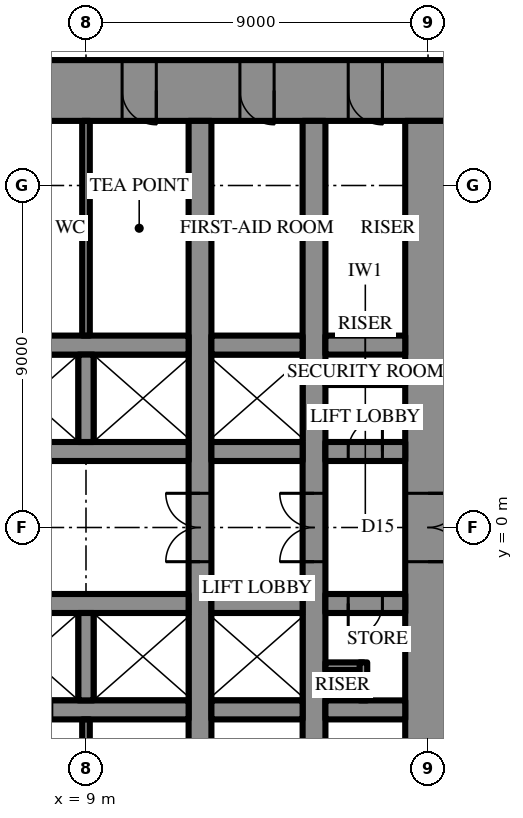
"""IFC4 building model, lengths in metres.
Left out: names, types, materials, properties, quantities, classifications, styles, units other than length and angle.
Written with IfcOpenShell. Run it as: python <this file> out.ifc"""

import sys

from ifc_helpers import new_model, si_unit, direction, frame, frame_2d, origin, place, context, subcontext, project, spatial, rectangle, extrude, element, fill, save


model = new_model("IFC4")
c1 = context("Model", 3, precision=1e-05, world=origin(), true_north=direction((0.0, 1.0)))
c2 = subcontext(c1, "Body", "Model", "MODEL_VIEW")
j1 = project(units=[si_unit("LENGTHUNIT", "METRE"), si_unit("PLANEANGLEUNIT", "RADIAN")], contexts=[c1])
p1 = place(None, origin())
s1 = spatial("IfcSite", under=j1, at=p1, CompositionType="ELEMENT")
p2 = place(p1, origin())
s2 = spatial("IfcBuilding", under=s1, at=p2, CompositionType="ELEMENT")
p3 = place(p2, frame((0.0, 0.0, 186.7)))
s3 = spatial("IfcBuildingStorey", under=s2, at=p3, CompositionType="ELEMENT", Elevation=186.7)
p4 = place(p3, frame((-18.6, 11.5, 0.0), z_axis=(0.0, 0.0, 1.0), x_axis=(1.0, 0.0, 0.0)))
e1 = element("IfcWall", 1, at=p4, inside=s3, PredefinedType="SHEAR", context=c2, shape_type="SweptSolid", body=[
    extrude(rectangle(XDim=37.2, YDim=1.6, at=frame_2d((18.6, 0.0))), origin(), (0.0, 0.0, 1.0), 4.2),
])
p5 = place(p4, frame((19.45, 0.0, 0.0)))
e2 = element("IfcOpeningElement", 2, at=p5, cuts=e1, PredefinedType="OPENING", context=c2, shape_type="SweptSolid", body=[
    extrude(rectangle(XDim=0.9, YDim=2.2, at=frame_2d((0.45, 1.1))), frame((0.0, 0.81, 0.0), z_axis=(0.0, -1.0, 0.0), x_axis=(1.0, 0.0, 0.0)), (0.0, 0.0, 1.0), 1.62),
])
p6 = place(p4, frame((22.45, 0.0, 0.0)))
e3 = element("IfcOpeningElement", 3, at=p6, cuts=e1, PredefinedType="OPENING", context=c2, shape_type="SweptSolid", body=[
    extrude(rectangle(XDim=0.9, YDim=2.2, at=frame_2d((0.45, 1.1))), frame((0.0, 0.81, 0.0), z_axis=(0.0, -1.0, 0.0), x_axis=(1.0, 0.0, 0.0)), (0.0, 0.0, 1.0), 1.62),
])
p7 = place(p4, frame((25.5, 0.0, 0.0)))
e4 = element("IfcOpeningElement", 4, at=p7, cuts=e1, PredefinedType="OPENING", context=c2, shape_type="SweptSolid", body=[
    extrude(rectangle(XDim=1.0, YDim=2.2, at=frame_2d((0.5, 1.1))), frame((0.0, 0.81, 0.0), z_axis=(0.0, -1.0, 0.0), x_axis=(1.0, 0.0, 0.0)), (0.0, 0.0, 1.0), 1.62),
])
p8 = place(p4, frame((1.8, 0.0, 0.0)))
e5 = element("IfcOpeningElement", 5, at=p8, cuts=e1, PredefinedType="OPENING", context=c2, shape_type="SweptSolid", body=[
    extrude(rectangle(XDim=0.9, YDim=2.2, at=frame_2d((0.45, 1.1))), frame((0.0, 0.81, 0.0), z_axis=(0.0, -1.0, 0.0), x_axis=(1.0, 0.0, 0.0)), (0.0, 0.0, 1.0), 1.62),
])
p9 = place(p4, frame((4.65, 0.0, 0.0)))
e6 = element("IfcOpeningElement", 6, at=p9, cuts=e1, PredefinedType="OPENING", context=c2, shape_type="SweptSolid", body=[
    extrude(rectangle(XDim=0.9, YDim=2.2, at=frame_2d((0.45, 1.1))), frame((0.0, 0.81, 0.0), z_axis=(0.0, -1.0, 0.0), x_axis=(1.0, 0.0, 0.0)), (0.0, 0.0, 1.0), 1.62),
])
p10 = place(p4, frame((7.75, 0.0, 0.0)))
e7 = element("IfcOpeningElement", 7, at=p10, cuts=e1, PredefinedType="OPENING", context=c2, shape_type="SweptSolid", body=[
    extrude(rectangle(XDim=0.9, YDim=2.2, at=frame_2d((0.45, 1.1))), frame((0.0, 0.81, 0.0), z_axis=(0.0, -1.0, 0.0), x_axis=(1.0, 0.0, 0.0)), (0.0, 0.0, 1.0), 1.62),
])
p11 = place(p4, frame((28.55, 0.0, 0.0)))
e8 = element("IfcOpeningElement", 8, at=p11, cuts=e1, PredefinedType="OPENING", context=c2, shape_type="SweptSolid", body=[
    extrude(rectangle(XDim=0.9, YDim=2.2, at=frame_2d((0.45, 1.1))), frame((0.0, 0.81, 0.0), z_axis=(0.0, -1.0, 0.0), x_axis=(1.0, 0.0, 0.0)), (0.0, 0.0, 1.0), 1.62),
])
p12 = place(p4, frame((31.65, 0.0, 0.0)))
e9 = element("IfcOpeningElement", 9, at=p12, cuts=e1, PredefinedType="OPENING", context=c2, shape_type="SweptSolid", body=[
    extrude(rectangle(XDim=0.9, YDim=2.2, at=frame_2d((0.45, 1.1))), frame((0.0, 0.81, 0.0), z_axis=(0.0, -1.0, 0.0), x_axis=(1.0, 0.0, 0.0)), (0.0, 0.0, 1.0), 1.62),
])
p13 = place(p4, frame((34.5, 0.0, 0.0)))
e10 = element("IfcOpeningElement", 10, at=p13, cuts=e1, PredefinedType="OPENING", context=c2, shape_type="SweptSolid", body=[
    extrude(rectangle(XDim=0.9, YDim=2.2, at=frame_2d((0.45, 1.1))), frame((0.0, 0.81, 0.0), z_axis=(0.0, -1.0, 0.0), x_axis=(1.0, 0.0, 0.0)), (0.0, 0.0, 1.0), 1.62),
])
p14 = place(p3, frame((18.0, -10.7, 0.0), z_axis=(0.0, 0.0, 1.0), x_axis=(0.0, 1.0, 0.0)))
e11 = element("IfcWall", 11, at=p14, inside=s3, PredefinedType="SHEAR", context=c2, shape_type="SweptSolid", body=[
    extrude(rectangle(XDim=21.4, YDim=1.2, at=frame_2d((10.7, 0.0))), origin(), (0.0, 0.0, 1.0), 4.2),
])
p15 = place(p14, frame((9.8, 0.0, 0.0)))
e12 = element("IfcOpeningElement", 12, at=p15, cuts=e11, PredefinedType="OPENING", context=c2, shape_type="SweptSolid", body=[
    extrude(rectangle(XDim=1.8, YDim=2.4, at=frame_2d((0.9, 1.2))), frame((0.0, 0.61, 0.0), z_axis=(0.0, -1.0, 0.0), x_axis=(1.0, 0.0, 0.0)), (0.0, 0.0, 1.0), 1.22),
])
p16 = place(p3, frame((12.0, -10.7, 0.0), z_axis=(0.0, 0.0, 1.0), x_axis=(0.0, 1.0, 0.0)))
e13 = element("IfcWall", 13, at=p16, inside=s3, PredefinedType="SHEAR", context=c2, shape_type="SweptSolid", body=[
    extrude(rectangle(XDim=21.4, YDim=0.6, at=frame_2d((10.7, 0.0))), origin(), (0.0, 0.0, 1.0), 4.2),
])
p17 = place(p16, frame((9.8, 0.0, 0.0)))
e14 = element("IfcOpeningElement", 14, at=p17, cuts=e13, PredefinedType="OPENING", context=c2, shape_type="SweptSolid", body=[
    extrude(rectangle(XDim=1.8, YDim=2.4, at=frame_2d((0.9, 1.2))), frame((0.0, 0.31, 0.0), z_axis=(0.0, -1.0, 0.0), x_axis=(1.0, 0.0, 0.0)), (0.0, 0.0, 1.0), 0.62),
])
p18 = place(p3, frame((15.0, -10.7, 0.0), z_axis=(0.0, 0.0, 1.0), x_axis=(0.0, 1.0, 0.0)))
e15 = element("IfcWall", 15, at=p18, inside=s3, PredefinedType="SHEAR", context=c2, shape_type="SweptSolid", body=[
    extrude(rectangle(XDim=21.4, YDim=0.6, at=frame_2d((10.7, 0.0))), origin(), (0.0, 0.0, 1.0), 4.2),
])
p19 = place(p18, frame((9.8, 0.0, 0.0)))
e16 = element("IfcOpeningElement", 16, at=p19, cuts=e15, PredefinedType="OPENING", context=c2, shape_type="SweptSolid", body=[
    extrude(rectangle(XDim=1.8, YDim=2.4, at=frame_2d((0.9, 1.2))), frame((0.0, 0.31, 0.0), z_axis=(0.0, -1.0, 0.0), x_axis=(1.0, 0.0, 0.0)), (0.0, 0.0, 1.0), 0.62),
])
p20 = place(p3, frame((-3.2, 2.0, 0.0), z_axis=(0.0, 0.0, 1.0), x_axis=(1.0, 0.0, 0.0)))
e17 = element("IfcWall", 17, at=p20, inside=s3, PredefinedType="SHEAR", context=c2, shape_type="SweptSolid", body=[
    extrude(rectangle(XDim=14.9, YDim=0.5, at=frame_2d((7.45, 0.0))), origin(), (0.0, 0.0, 1.0), 4.2),
])
p21 = place(p20, frame((1.15, 0.0, 0.0)))
e18 = element("IfcOpeningElement", 18, at=p21, cuts=e17, PredefinedType="OPENING", context=c2, shape_type="SweptSolid", body=[
    extrude(rectangle(XDim=1.1, YDim=2.2, at=frame_2d((0.55, 1.1))), frame((0.0, 0.26, 0.0), z_axis=(0.0, -1.0, 0.0), x_axis=(1.0, 0.0, 0.0)), (0.0, 0.0, 1.0), 0.52),
])
p22 = place(p20, frame((4.15, 0.0, 0.0)))
e19 = element("IfcOpeningElement", 19, at=p22, cuts=e17, PredefinedType="OPENING", context=c2, shape_type="SweptSolid", body=[
    extrude(rectangle(XDim=1.1, YDim=2.2, at=frame_2d((0.55, 1.1))), frame((0.0, 0.26, 0.0), z_axis=(0.0, -1.0, 0.0), x_axis=(1.0, 0.0, 0.0)), (0.0, 0.0, 1.0), 0.52),
])
p23 = place(p20, frame((7.15, 0.0, 0.0)))
e20 = element("IfcOpeningElement", 20, at=p23, cuts=e17, PredefinedType="OPENING", context=c2, shape_type="SweptSolid", body=[
    extrude(rectangle(XDim=1.1, YDim=2.2, at=frame_2d((0.55, 1.1))), frame((0.0, 0.26, 0.0), z_axis=(0.0, -1.0, 0.0), x_axis=(1.0, 0.0, 0.0)), (0.0, 0.0, 1.0), 0.52),
])
p24 = place(p20, frame((10.15, 0.0, 0.0)))
e21 = element("IfcOpeningElement", 21, at=p24, cuts=e17, PredefinedType="OPENING", context=c2, shape_type="SweptSolid", body=[
    extrude(rectangle(XDim=1.1, YDim=2.2, at=frame_2d((0.55, 1.1))), frame((0.0, 0.26, 0.0), z_axis=(0.0, -1.0, 0.0), x_axis=(1.0, 0.0, 0.0)), (0.0, 0.0, 1.0), 0.52),
])
p25 = place(p3, frame((12.3, 2.0, 0.0), z_axis=(0.0, 0.0, 1.0), x_axis=(1.0, 0.0, 0.0)))
e22 = element("IfcWall", 22, at=p25, inside=s3, PredefinedType="SHEAR", context=c2, shape_type="SweptSolid", body=[
    extrude(rectangle(XDim=2.4, YDim=0.5, at=frame_2d((1.2, 0.0))), origin(), (0.0, 0.0, 1.0), 4.2),
])
p26 = place(p3, frame((15.3, 2.0, 0.0), z_axis=(0.0, 0.0, 1.0), x_axis=(1.0, 0.0, 0.0)))
e23 = element("IfcWall", 23, at=p26, inside=s3, PredefinedType="SHEAR", context=c2, shape_type="SweptSolid", body=[
    extrude(rectangle(XDim=2.1, YDim=0.5, at=frame_2d((1.05, 0.0))), origin(), (0.0, 0.0, 1.0), 4.2),
])
p27 = place(p26, frame((0.6, 0.0, 0.0)))
e24 = element("IfcOpeningElement", 24, at=p27, cuts=e23, PredefinedType="OPENING", context=c2, shape_type="SweptSolid", body=[
    extrude(rectangle(XDim=0.9, YDim=2.2, at=frame_2d((0.45, 1.1))), frame((0.0, 0.26, 0.0), z_axis=(0.0, -1.0, 0.0), x_axis=(1.0, 0.0, 0.0)), (0.0, 0.0, 1.0), 0.52),
])
p28 = place(p3, frame((-11.7, 4.8, 0.0), z_axis=(0.0, 0.0, 1.0), x_axis=(1.0, 0.0, 0.0)))
e25 = element("IfcWall", 25, at=p28, inside=s3, PredefinedType="SHEAR", context=c2, shape_type="SweptSolid", body=[
    extrude(rectangle(XDim=23.4, YDim=0.5, at=frame_2d((11.7, 0.0))), origin(), (0.0, 0.0, 1.0), 4.2),
])
p29 = place(p28, frame((6.6, 0.0, 0.0)))
e26 = element("IfcOpeningElement", 26, at=p29, cuts=e25, PredefinedType="OPENING", context=c2, shape_type="SweptSolid", body=[
    extrude(rectangle(XDim=1.2, YDim=2.2, at=frame_2d((0.6, 1.1))), frame((0.0, 0.26, 0.0), z_axis=(0.0, -1.0, 0.0), x_axis=(1.0, 0.0, 0.0)), (0.0, 0.0, 1.0), 0.52),
])
p30 = place(p28, frame((3.6, 0.0, 0.0)))
e27 = element("IfcOpeningElement", 27, at=p30, cuts=e25, PredefinedType="OPENING", context=c2, shape_type="SweptSolid", body=[
    extrude(rectangle(XDim=1.2, YDim=2.2, at=frame_2d((0.6, 1.1))), frame((0.0, 0.26, 0.0), z_axis=(0.0, -1.0, 0.0), x_axis=(1.0, 0.0, 0.0)), (0.0, 0.0, 1.0), 0.52),
])
p31 = place(p3, frame((12.3, 4.8, 0.0), z_axis=(0.0, 0.0, 1.0), x_axis=(1.0, 0.0, 0.0)))
e28 = element("IfcWall", 28, at=p31, inside=s3, PredefinedType="SHEAR", context=c2, shape_type="SweptSolid", body=[
    extrude(rectangle(XDim=2.4, YDim=0.5, at=frame_2d((1.2, 0.0))), origin(), (0.0, 0.0, 1.0), 4.2),
])
p32 = place(p3, frame((15.3, 4.8, 0.0), z_axis=(0.0, 0.0, 1.0), x_axis=(1.0, 0.0, 0.0)))
e29 = element("IfcWall", 29, at=p32, inside=s3, PredefinedType="SHEAR", context=c2, shape_type="SweptSolid", body=[
    extrude(rectangle(XDim=2.1, YDim=0.5, at=frame_2d((1.05, 0.0))), origin(), (0.0, 0.0, 1.0), 4.2),
])
p33 = place(p3, frame((9.0, 2.25, 0.0), z_axis=(0.0, 0.0, 1.0), x_axis=(0.0, 1.0, 0.0)))
e30 = element("IfcWall", 30, at=p33, inside=s3, PredefinedType="SHEAR", context=c2, shape_type="SweptSolid", body=[
    extrude(rectangle(XDim=2.3, YDim=0.4, at=frame_2d((1.15, 0.0))), origin(), (0.0, 0.0, 1.0), 4.2),
])
p34 = place(p3, frame((17.4, -2.0, 0.0), z_axis=(0.0, 0.0, 1.0), x_axis=(-1.0, 0.0, 0.0)))
e31 = element("IfcWall", 31, at=p34, inside=s3, PredefinedType="SHEAR", context=c2, shape_type="SweptSolid", body=[
    extrude(rectangle(XDim=2.1, YDim=0.5, at=frame_2d((1.05, 0.0))), origin(), (0.0, 0.0, 1.0), 4.2),
])
p35 = place(p34, frame((0.6, 0.0, 0.0)))
e32 = element("IfcOpeningElement", 32, at=p35, cuts=e31, PredefinedType="OPENING", context=c2, shape_type="SweptSolid", body=[
    extrude(rectangle(XDim=0.9, YDim=2.2, at=frame_2d((0.45, 1.1))), frame((0.0, 0.26, 0.0), z_axis=(0.0, -1.0, 0.0), x_axis=(1.0, 0.0, 0.0)), (0.0, 0.0, 1.0), 0.52),
])
p36 = place(p3, frame((14.7, -2.0, 0.0), z_axis=(0.0, 0.0, 1.0), x_axis=(-1.0, 0.0, 0.0)))
e33 = element("IfcWall", 33, at=p36, inside=s3, PredefinedType="SHEAR", context=c2, shape_type="SweptSolid", body=[
    extrude(rectangle(XDim=2.4, YDim=0.5, at=frame_2d((1.2, 0.0))), origin(), (0.0, 0.0, 1.0), 4.2),
])
p37 = place(p3, frame((11.7, -2.0, 0.0), z_axis=(0.0, 0.0, 1.0), x_axis=(-1.0, 0.0, 0.0)))
e34 = element("IfcWall", 34, at=p37, inside=s3, PredefinedType="SHEAR", context=c2, shape_type="SweptSolid", body=[
    extrude(rectangle(XDim=5.9, YDim=0.5, at=frame_2d((2.95, 0.0))), origin(), (0.0, 0.0, 1.0), 4.2),
])
p38 = place(p3, frame((17.4, -4.8, 0.0), z_axis=(0.0, 0.0, 1.0), x_axis=(-1.0, 0.0, 0.0)))
e35 = element("IfcWall", 35, at=p38, inside=s3, PredefinedType="SHEAR", context=c2, shape_type="SweptSolid", body=[
    extrude(rectangle(XDim=2.1, YDim=0.5, at=frame_2d((1.05, 0.0))), origin(), (0.0, 0.0, 1.0), 4.2),
])
p39 = place(p3, frame((14.7, -4.8, 0.0), z_axis=(0.0, 0.0, 1.0), x_axis=(-1.0, 0.0, 0.0)))
e36 = element("IfcWall", 36, at=p39, inside=s3, PredefinedType="SHEAR", context=c2, shape_type="SweptSolid", body=[
    extrude(rectangle(XDim=2.4, YDim=0.5, at=frame_2d((1.2, 0.0))), origin(), (0.0, 0.0, 1.0), 4.2),
])
p40 = place(p3, frame((11.7, -4.8, 0.0), z_axis=(0.0, 0.0, 1.0), x_axis=(-1.0, 0.0, 0.0)))
e37 = element("IfcWall", 37, at=p40, inside=s3, PredefinedType="SHEAR", context=c2, shape_type="SweptSolid", body=[
    extrude(rectangle(XDim=23.4, YDim=0.5, at=frame_2d((11.7, 0.0))), origin(), (0.0, 0.0, 1.0), 4.2),
])
p41 = place(p40, frame((6.6, 0.0, 0.0)))
e38 = element("IfcOpeningElement", 38, at=p41, cuts=e37, PredefinedType="OPENING", context=c2, shape_type="SweptSolid", body=[
    extrude(rectangle(XDim=1.2, YDim=2.2, at=frame_2d((0.6, 1.1))), frame((0.0, 0.26, 0.0), z_axis=(0.0, -1.0, 0.0), x_axis=(1.0, 0.0, 0.0)), (0.0, 0.0, 1.0), 0.52),
])
p42 = place(p40, frame((3.6, 0.0, 0.0)))
e39 = element("IfcOpeningElement", 39, at=p42, cuts=e37, PredefinedType="OPENING", context=c2, shape_type="SweptSolid", body=[
    extrude(rectangle(XDim=1.2, YDim=2.2, at=frame_2d((0.6, 1.1))), frame((0.0, 0.26, 0.0), z_axis=(0.0, -1.0, 0.0), x_axis=(1.0, 0.0, 0.0)), (0.0, 0.0, 1.0), 0.52),
])
p43 = place(p3, frame((9.0, -2.25, 0.0), z_axis=(0.0, 0.0, 1.0), x_axis=(0.0, -1.0, 0.0)))
e40 = element("IfcWall", 40, at=p43, inside=s3, PredefinedType="SHEAR", context=c2, shape_type="SweptSolid", body=[
    extrude(rectangle(XDim=2.3, YDim=0.4, at=frame_2d((1.15, 0.0))), origin(), (0.0, 0.0, 1.0), 4.2),
])
for number, where, z_axis, x_axis in (
    (41, (9.0, 5.05, 0.0), (0.0, 0.0, 1.0), (0.0, 1.0, 0.0)),
    (42, (9.0, -5.05, 0.0), (0.0, 0.0, 1.0), (0.0, -1.0, 0.0)),
):
    element("IfcWall", number, at=place(p3, frame(where, z_axis=z_axis, x_axis=x_axis)), inside=s3, PredefinedType="PARTITIONING", context=c2, shape_type="SweptSolid", body=[
        extrude(rectangle(XDim=5.65, YDim=0.2, at=frame_2d((2.825, 0.0))), origin(), (0.0, 0.0, 1.0), 4.0),
    ])
p44 = place(p3, frame((15.3, 3.85, 0.0), z_axis=(0.0, 0.0, 1.0), x_axis=(1.0, 0.0, 0.0)))
e43 = element("IfcWall", 43, at=p44, inside=s3, PredefinedType="PARTITIONING", context=c2, shape_type="SweptSolid", body=[
    extrude(rectangle(XDim=2.1, YDim=0.2, at=frame_2d((1.05, 0.0))), origin(), (0.0, 0.0, 1.0), 4.0),
])
for number, where, z_axis, x_axis in (
    (44, (16.3, -3.65, 0.0), (0.0, 0.0, 1.0), (-1.0, 0.0, 0.0)),
    (45, (16.3, -3.55, 0.0), (0.0, 0.0, 1.0), (0.0, -1.0, 0.0)),
):
    element("IfcWall", number, at=place(p3, frame(where, z_axis=z_axis, x_axis=x_axis)), inside=s3, PredefinedType="PARTITIONING", context=c2, shape_type="SweptSolid", body=[
        extrude(rectangle(XDim=1.0, YDim=0.2, at=frame_2d((0.5, 0.0))), origin(), (0.0, 0.0, 1.0), 4.0),
    ])
p45 = place(p3, frame((28.436, 4.747, 0.0), z_axis=(0.0, 0.0, 1.0), x_axis=(-0.499995666571, 0.866027905677, 0.0)))
e46 = element("IfcWall", 46, at=p45, inside=s3, PredefinedType="PARTITIONING", context=c2, shape_type="SweptSolid", body=[
    extrude(rectangle(XDim=20.215, YDim=0.2, at=frame_2d((10.107, 0.0))), origin(), (0.0, 0.0, 1.0), 4.0),
])
p46 = place(p45, frame((2.102, 0.0, 0.0)))
e47 = element("IfcOpeningElement", 47, at=p46, cuts=e46, PredefinedType="OPENING", context=c2, shape_type="SweptSolid", body=[
    extrude(rectangle(XDim=1.0, YDim=2.2, at=frame_2d((0.5, 1.1))), frame((0.0, 0.11, 0.0), z_axis=(0.0, -1.0, 0.0), x_axis=(1.0, 0.0, 0.0)), (0.0, 0.0, 1.0), 0.22),
])
p47 = place(p45, frame((7.105, 0.0, 0.0)))
e48 = element("IfcOpeningElement", 48, at=p47, cuts=e46, PredefinedType="OPENING", context=c2, shape_type="SweptSolid", body=[
    extrude(rectangle(XDim=1.0, YDim=2.2, at=frame_2d((0.5, 1.1))), frame((0.0, 0.11, 0.0), z_axis=(0.0, -1.0, 0.0), x_axis=(1.0, 0.0, 0.0)), (0.0, 0.0, 1.0), 0.22),
])
p48 = place(p45, frame((12.109, 0.0, 0.0)))
e49 = element("IfcOpeningElement", 49, at=p48, cuts=e46, PredefinedType="OPENING", context=c2, shape_type="SweptSolid", body=[
    extrude(rectangle(XDim=1.0, YDim=2.2, at=frame_2d((0.5, 1.1))), frame((0.0, 0.11, 0.0), z_axis=(0.0, -1.0, 0.0), x_axis=(1.0, 0.0, 0.0)), (0.0, 0.0, 1.0), 0.22),
])
p49 = place(p45, frame((17.113, 0.0, 0.0)))
e50 = element("IfcOpeningElement", 50, at=p49, cuts=e46, PredefinedType="OPENING", context=c2, shape_type="SweptSolid", body=[
    extrude(rectangle(XDim=1.0, YDim=2.2, at=frame_2d((0.5, 1.1))), frame((0.0, 0.11, 0.0), z_axis=(0.0, -1.0, 0.0), x_axis=(1.0, 0.0, 0.0)), (0.0, 0.0, 1.0), 0.22),
])
p50 = place(p15, frame((1.8, 0.0, 0.0), z_axis=(0.0, 0.0, 1.0), x_axis=(-1.0, 0.0, 0.0)))
e51 = element("IfcDoor", 51, at=p50, inside=s3, OperationType="DOUBLE_DOOR_SINGLE_SWING", PredefinedType="DOOR", context=c2, shape_type="SweptSolid", body=[
    extrude(rectangle(XDim=1.8, YDim=2.4, at=frame_2d((0.9, 1.2))), frame((0.0, 0.025, 0.0), z_axis=(0.0, -1.0, 0.0), x_axis=(1.0, 0.0, 0.0)), (0.0, 0.0, 1.0), 0.05),
])
fill(e12, e51)
p51 = place(p11, frame((0.9, 0.0, 0.0), z_axis=(0.0, 0.0, 1.0), x_axis=(-1.0, 0.0, 0.0)))
e52 = element("IfcDoor", 52, at=p51, inside=s3, OperationType="SINGLE_SWING_RIGHT", PredefinedType="DOOR", context=c2, shape_type="SweptSolid", body=[
    extrude(rectangle(XDim=0.9, YDim=2.2, at=frame_2d((0.45, 1.1))), frame((0.0, 0.025, 0.0), z_axis=(0.0, -1.0, 0.0), x_axis=(1.0, 0.0, 0.0)), (0.0, 0.0, 1.0), 0.05),
])
fill(e8, e52)
p52 = place(p12, frame((0.9, 0.0, 0.0), z_axis=(0.0, 0.0, 1.0), x_axis=(-1.0, 0.0, 0.0)))
e53 = element("IfcDoor", 53, at=p52, inside=s3, OperationType="SINGLE_SWING_RIGHT", PredefinedType="DOOR", context=c2, shape_type="SweptSolid", body=[
    extrude(rectangle(XDim=0.9, YDim=2.2, at=frame_2d((0.45, 1.1))), frame((0.0, 0.025, 0.0), z_axis=(0.0, -1.0, 0.0), x_axis=(1.0, 0.0, 0.0)), (0.0, 0.0, 1.0), 0.05),
])
fill(e9, e53)
p53 = place(p13, frame((0.9, 0.0, 0.0), z_axis=(0.0, 0.0, 1.0), x_axis=(-1.0, 0.0, 0.0)))
e54 = element("IfcDoor", 54, at=p53, inside=s3, OperationType="SINGLE_SWING_RIGHT", PredefinedType="DOOR", context=c2, shape_type="SweptSolid", body=[
    extrude(rectangle(XDim=0.9, YDim=2.2, at=frame_2d((0.45, 1.1))), frame((0.0, 0.025, 0.0), z_axis=(0.0, -1.0, 0.0), x_axis=(1.0, 0.0, 0.0)), (0.0, 0.0, 1.0), 0.05),
])
fill(e10, e54)
p54 = place(p27, origin())
e55 = element("IfcDoor", 55, at=p54, inside=s3, OperationType="SINGLE_SWING_LEFT", PredefinedType="DOOR", context=c2, shape_type="SweptSolid", body=[
    extrude(rectangle(XDim=0.9, YDim=2.2, at=frame_2d((0.45, 1.1))), frame((0.0, 0.025, 0.0), z_axis=(0.0, -1.0, 0.0), x_axis=(1.0, 0.0, 0.0)), (0.0, 0.0, 1.0), 0.05),
])
fill(e24, e55)
p55 = place(p35, origin())
e56 = element("IfcDoor", 56, at=p55, inside=s3, OperationType="SINGLE_SWING_LEFT", PredefinedType="DOOR", context=c2, shape_type="SweptSolid", body=[
    extrude(rectangle(XDim=0.9, YDim=2.2, at=frame_2d((0.45, 1.1))), frame((0.0, 0.025, 0.0), z_axis=(0.0, -1.0, 0.0), x_axis=(1.0, 0.0, 0.0)), (0.0, 0.0, 1.0), 0.05),
])
fill(e32, e56)
p56 = place(p17, origin())
e57 = element("IfcDoor", 57, at=p56, inside=s3, OperationType="DOUBLE_DOOR_SINGLE_SWING", PredefinedType="DOOR", context=c2, shape_type="SweptSolid", body=[
    extrude(rectangle(XDim=1.8, YDim=2.4, at=frame_2d((0.9, 1.2))), frame((0.0, 0.025, 0.0), z_axis=(0.0, -1.0, 0.0), x_axis=(1.0, 0.0, 0.0)), (0.0, 0.0, 1.0), 0.05),
])
fill(e14, e57)
p57 = place(p19, origin())
e58 = element("IfcDoor", 58, at=p57, inside=s3, OperationType="DOUBLE_DOOR_SINGLE_SWING", PredefinedType="DOOR", context=c2, shape_type="SweptSolid", body=[
    extrude(rectangle(XDim=1.8, YDim=2.4, at=frame_2d((0.9, 1.2))), frame((0.0, 0.025, 0.0), z_axis=(0.0, -1.0, 0.0), x_axis=(1.0, 0.0, 0.0)), (0.0, 0.0, 1.0), 0.05),
])
fill(e16, e58)
save(model, sys.argv[1])
